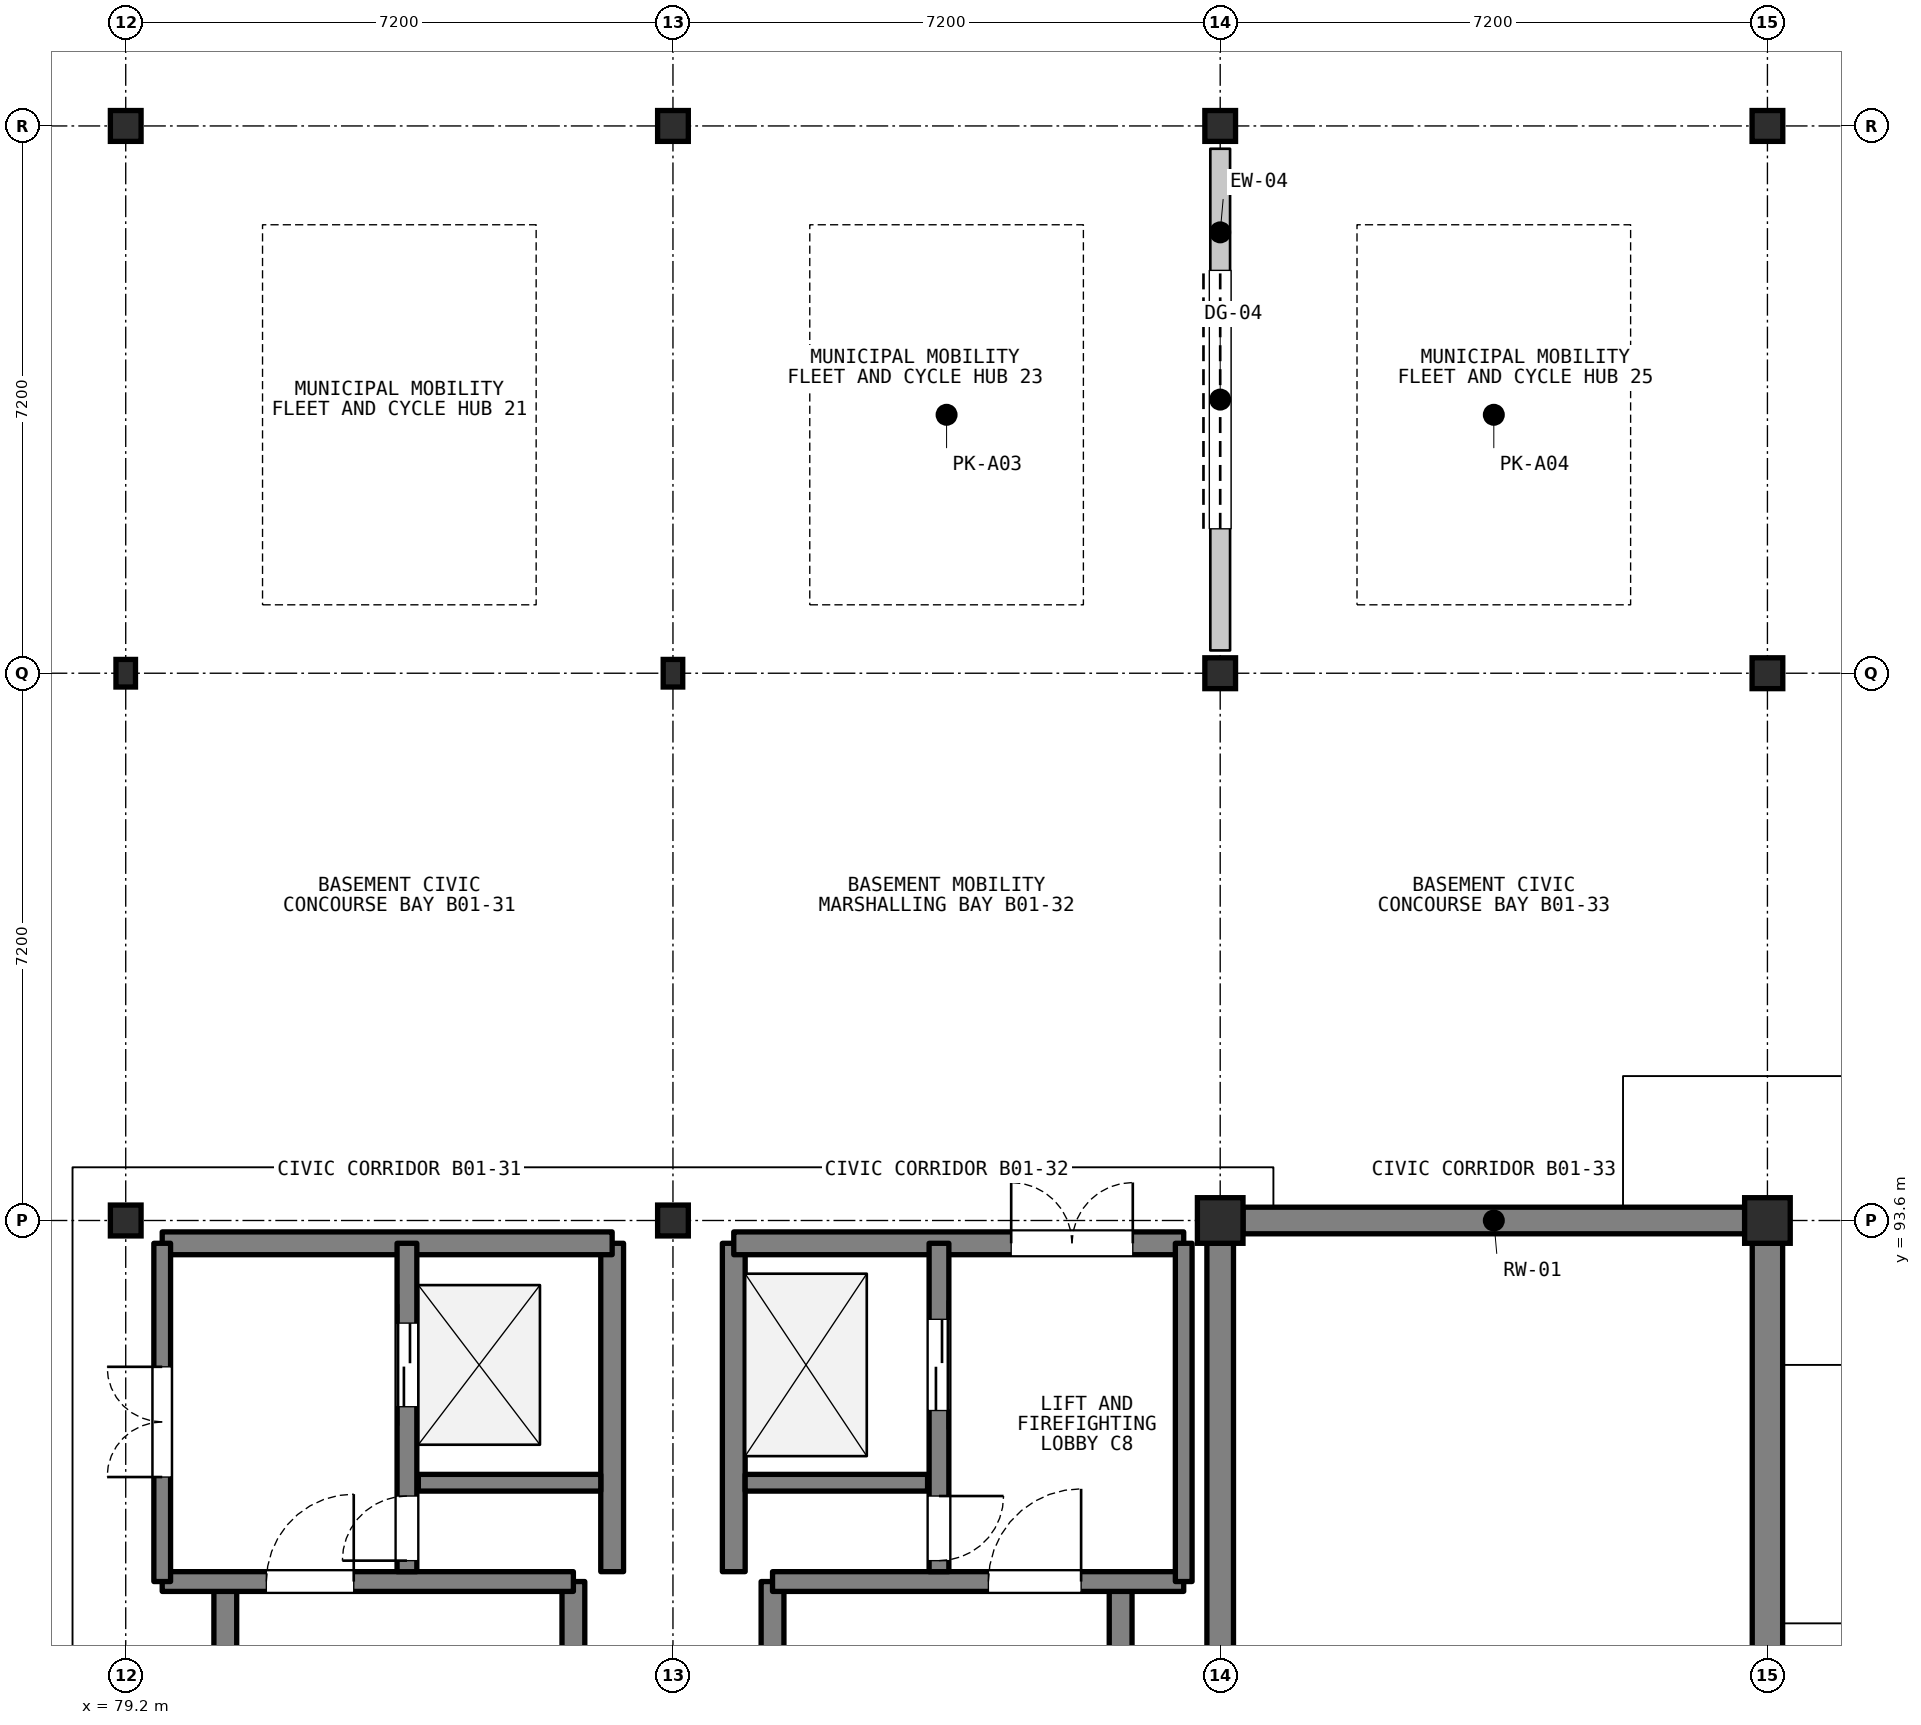
"""IFC4 building model, lengths in metres.
Left out: names, types, materials, properties, quantities, classifications, styles, units other than length and angle.
Written with IfcOpenShell. Run it as: python <this file> out.ifc"""

import sys

from ifc_helpers import new_model, si_unit, direction, frame, frame_2d, origin, origin_2d, place, context, subcontext, project, spatial, rectangle, i_section, extrude, element, fill, save


model = new_model("IFC4")
c1 = context("Model", 3, precision=1e-05, world=origin(), true_north=direction((0.0, 1.0)))
c2 = subcontext(c1, "Body", "Model", "MODEL_VIEW")
j1 = project(units=[si_unit("LENGTHUNIT", "METRE"), si_unit("PLANEANGLEUNIT", "RADIAN")], contexts=[c1])
p1 = place(None, origin())
s1 = spatial("IfcSite", under=j1, at=p1, CompositionType="ELEMENT")
p2 = place(p1, origin())
s2 = spatial("IfcBuilding", under=s1, at=p2, CompositionType="ELEMENT")
p3 = place(p2, frame((0.0, 0.0, -4.2)))
s3 = spatial("IfcBuildingStorey", under=s2, at=p3, CompositionType="ELEMENT", Elevation=-4.2)
for number, where, z_axis, x_axis in (
    (1, (93.6, 86.7, 0.0), (0.0, 0.0, 1.0), (0.0, 1.0, 0.0)),
    (2, (93.9, 93.6, 0.0), (0.0, 0.0, 1.0), (1.0, 0.0, 0.0)),
):
    element("IfcWall", number, at=place(p3, frame(where, z_axis=z_axis, x_axis=x_axis)), inside=s3, PredefinedType="USERDEFINED", context=c2, shape_type="SweptSolid", body=[
        extrude(rectangle(XDim=6.6, YDim=0.35, at=frame_2d((3.3, 0.0))), origin(), (0.0, 0.0, 1.0), 3.98),
    ])
p4 = place(p3, frame((100.8, 86.7, 0.0), z_axis=(0.0, 0.0, 1.0), x_axis=(0.0, 1.0, 0.0)))
e3 = element("IfcWall", 3, at=p4, inside=s3, PredefinedType="USERDEFINED", context=c2, shape_type="SweptSolid", body=[
    extrude(rectangle(XDim=6.6, YDim=0.4, at=frame_2d((3.3, 0.0))), origin(), (0.0, 0.0, 1.0), 3.98),
])
p5 = place(p3, frame((79.2, 93.6, 0.0), z_axis=(0.0, 0.0, 1.0), x_axis=(1.0, 0.0, 0.0)))
e4 = element("IfcColumn", 4, at=p5, inside=s3, PredefinedType="COLUMN", context=c2, shape_type="SweptSolid", body=[
    extrude(i_section(OverallWidth=0.404, OverallDepth=0.406, WebThickness=0.027, FlangeThickness=0.044, FilletRadius=0.015, at=origin_2d()), origin(), (0.0, 0.0, 1.0), 4.2),
])
p6 = place(p3, frame((79.2, 100.8, 0.0), z_axis=(0.0, 0.0, 1.0), x_axis=(1.0, 0.0, 0.0)))
e5 = element("IfcColumn", 5, at=p6, inside=s3, PredefinedType="COLUMN", context=c2, shape_type="SweptSolid", body=[
    extrude(i_section(OverallWidth=0.257, OverallDepth=0.363, WebThickness=0.013, FlangeThickness=0.022, FilletRadius=0.015, at=origin_2d()), origin(), (0.0, 0.0, 1.0), 4.2),
])
for number, where, z_axis, x_axis in (
    (6, (79.2, 108.0, 0.0), (0.0, 0.0, 1.0), (1.0, 0.0, 0.0)),
    (7, (86.4, 93.6, 0.0), (0.0, 0.0, 1.0), (1.0, 0.0, 0.0)),
):
    element("IfcColumn", number, at=place(p3, frame(where, z_axis=z_axis, x_axis=x_axis)), inside=s3, PredefinedType="COLUMN", context=c2, shape_type="SweptSolid", body=[
        extrude(i_section(OverallWidth=0.404, OverallDepth=0.406, WebThickness=0.027, FlangeThickness=0.044, FilletRadius=0.015, at=origin_2d()), origin(), (0.0, 0.0, 1.0), 4.2),
    ])
p7 = place(p3, frame((86.4, 100.8, 0.0), z_axis=(0.0, 0.0, 1.0), x_axis=(1.0, 0.0, 0.0)))
e8 = element("IfcColumn", 8, at=p7, inside=s3, PredefinedType="COLUMN", context=c2, shape_type="SweptSolid", body=[
    extrude(i_section(OverallWidth=0.257, OverallDepth=0.363, WebThickness=0.013, FlangeThickness=0.022, FilletRadius=0.015, at=origin_2d()), origin(), (0.0, 0.0, 1.0), 4.2),
])
p8 = place(p3, frame((86.4, 108.0, 0.0), z_axis=(0.0, 0.0, 1.0), x_axis=(1.0, 0.0, 0.0)))
e9 = element("IfcColumn", 9, at=p8, inside=s3, PredefinedType="COLUMN", context=c2, shape_type="SweptSolid", body=[
    extrude(i_section(OverallWidth=0.404, OverallDepth=0.406, WebThickness=0.027, FlangeThickness=0.044, FilletRadius=0.015, at=origin_2d()), origin(), (0.0, 0.0, 1.0), 4.2),
])
p9 = place(p3, frame((93.6, 93.6, 0.0), z_axis=(0.0, 0.0, 1.0), x_axis=(1.0, 0.0, 0.0)))
e10 = element("IfcColumn", 10, at=p9, inside=s3, PredefinedType="COLUMN", context=c2, shape_type="SweptSolid", body=[
    extrude(rectangle(XDim=0.6, YDim=0.6, at=origin_2d()), origin(), (0.0, 0.0, 1.0), 4.2),
])
for number, where, z_axis, x_axis in (
    (11, (93.6, 100.8, 0.0), (0.0, 0.0, 1.0), (1.0, 0.0, 0.0)),
    (12, (93.6, 108.0, 0.0), (0.0, 0.0, 1.0), (1.0, 0.0, 0.0)),
):
    element("IfcColumn", number, at=place(p3, frame(where, z_axis=z_axis, x_axis=x_axis)), inside=s3, PredefinedType="COLUMN", context=c2, shape_type="SweptSolid", body=[
        extrude(i_section(OverallWidth=0.404, OverallDepth=0.406, WebThickness=0.027, FlangeThickness=0.044, FilletRadius=0.015, at=origin_2d()), origin(), (0.0, 0.0, 1.0), 4.2),
    ])
p10 = place(p3, frame((100.8, 93.6, 0.0), z_axis=(0.0, 0.0, 1.0), x_axis=(1.0, 0.0, 0.0)))
e13 = element("IfcColumn", 13, at=p10, inside=s3, PredefinedType="COLUMN", context=c2, shape_type="SweptSolid", body=[
    extrude(rectangle(XDim=0.6, YDim=0.6, at=origin_2d()), origin(), (0.0, 0.0, 1.0), 4.2),
])
for number, where, z_axis, x_axis in (
    (14, (100.8, 100.8, 0.0), (0.0, 0.0, 1.0), (1.0, 0.0, 0.0)),
    (15, (100.8, 108.0, 0.0), (0.0, 0.0, 1.0), (1.0, 0.0, 0.0)),
):
    element("IfcColumn", number, at=place(p3, frame(where, z_axis=z_axis, x_axis=x_axis)), inside=s3, PredefinedType="COLUMN", context=c2, shape_type="SweptSolid", body=[
        extrude(i_section(OverallWidth=0.404, OverallDepth=0.406, WebThickness=0.027, FlangeThickness=0.044, FilletRadius=0.015, at=origin_2d()), origin(), (0.0, 0.0, 1.0), 4.2),
    ])
p11 = place(p3, frame((93.6, 101.1, 0.0), z_axis=(0.0, 0.0, 1.0), x_axis=(0.0, 1.0, 0.0)))
e16 = element("IfcWall", 16, at=p11, inside=s3, PredefinedType="SOLIDWALL", context=c2, shape_type="SweptSolid", body=[
    extrude(rectangle(XDim=6.6, YDim=0.26, at=frame_2d((3.3, 0.0))), origin(), (0.0, 0.0, 1.0), 3.22),
])
p12 = place(p11, frame((1.6, 0.0, 0.0)))
e17 = element("IfcOpeningElement", 17, at=p12, cuts=e16, PredefinedType="OPENING", context=c2, shape_type="SweptSolid", body=[
    extrude(rectangle(XDim=3.4, YDim=2.95, at=frame_2d((1.7, 1.475))), frame((0.0, 0.14, 0.0), z_axis=(0.0, -1.0, 0.0), x_axis=(1.0, 0.0, 0.0)), (0.0, 0.0, 1.0), 0.28),
])
for number, where, z_axis, x_axis in (
    (18, (80.51, 79.55, 0.0), (0.0, 0.0, 1.0), (0.0, 1.0, 0.0)),
    (19, (85.09, 79.55, 0.0), (0.0, 0.0, 1.0), (0.0, 1.0, 0.0)),
):
    element("IfcWall", number, at=place(p3, frame(where, z_axis=z_axis, x_axis=x_axis)), inside=s3, PredefinedType="SHEAR", context=c2, shape_type="SweptSolid", body=[
        extrude(rectangle(XDim=9.3, YDim=0.3, at=frame_2d((4.65, 0.0))), origin(), (0.0, 0.0, 1.0), 3.98),
    ])
p13 = place(p3, frame((79.68, 88.85, 0.0), z_axis=(0.0, 0.0, 1.0), x_axis=(1.0, 0.0, 0.0)))
e20 = element("IfcWall", 20, at=p13, inside=s3, PredefinedType="SHEAR", context=c2, shape_type="SweptSolid", body=[
    extrude(rectangle(XDim=5.41, YDim=0.26, at=frame_2d((2.705, 0.0))), origin(), (0.0, 0.0, 1.0), 3.98),
])
p14 = place(p13, frame((1.37, 0.0, 0.0)))
e21 = element("IfcOpeningElement", 21, at=p14, cuts=e20, PredefinedType="OPENING", context=c2, shape_type="SweptSolid", body=[
    extrude(rectangle(XDim=1.15, YDim=2.15, at=frame_2d((0.575, 1.075))), frame((0.0, 0.14, 0.0), z_axis=(0.0, -1.0, 0.0), x_axis=(1.0, 0.0, 0.0)), (0.0, 0.0, 1.0), 0.28),
])
p15 = place(p3, frame((85.6, 88.98, 0.0), z_axis=(0.0, 0.0, 1.0), x_axis=(0.0, 1.0, 0.0)))
e22 = element("IfcWall", 22, at=p15, inside=s3, PredefinedType="SHEAR", context=c2, shape_type="SweptSolid", body=[
    extrude(rectangle(XDim=4.32, YDim=0.3, at=frame_2d((2.16, 0.0))), origin(), (0.0, 0.0, 1.0), 3.98),
])
p16 = place(p3, frame((79.68, 93.3, 0.0), z_axis=(0.0, 0.0, 1.0), x_axis=(1.0, 0.0, 0.0)))
e23 = element("IfcWall", 23, at=p16, inside=s3, PredefinedType="SHEAR", context=c2, shape_type="SweptSolid", body=[
    extrude(rectangle(XDim=5.92, YDim=0.3, at=frame_2d((2.96, 0.0))), origin(), (0.0, 0.0, 1.0), 3.98),
])
p17 = place(p3, frame((83.05, 90.15, 0.0), z_axis=(0.0, 0.0, 1.0), x_axis=(1.0, 0.0, 0.0)))
e24 = element("IfcWall", 24, at=p17, inside=s3, PredefinedType="SHEAR", context=c2, shape_type="SweptSolid", body=[
    extrude(rectangle(XDim=2.4, YDim=0.22, at=frame_2d((1.2, 0.0))), origin(), (0.0, 0.0, 1.0), 3.98),
])
p18 = place(p3, frame((82.9, 88.98, 0.0), z_axis=(0.0, 0.0, 1.0), x_axis=(0.0, 1.0, 0.0)))
e25 = element("IfcWall", 25, at=p18, inside=s3, PredefinedType="SHEAR", context=c2, shape_type="SweptSolid", body=[
    extrude(rectangle(XDim=4.32, YDim=0.26, at=frame_2d((2.16, 0.0))), origin(), (0.0, 0.0, 1.0), 3.98),
])
p19 = place(p18, frame((2.17, 0.0, 0.0)))
e26 = element("IfcOpeningElement", 26, at=p19, cuts=e25, PredefinedType="OPENING", context=c2, shape_type="SweptSolid", body=[
    extrude(rectangle(XDim=1.1, YDim=2.15, at=frame_2d((0.55, 1.075))), frame((0.0, 0.14, 0.0), z_axis=(0.0, -1.0, 0.0), x_axis=(1.0, 0.0, 0.0)), (0.0, 0.0, 1.0), 0.28),
])
p20 = place(p18, frame((0.145, 0.0, 0.0)))
e27 = element("IfcOpeningElement", 27, at=p20, cuts=e25, PredefinedType="OPENING", context=c2, shape_type="SweptSolid", body=[
    extrude(rectangle(XDim=0.85, YDim=2.05, at=frame_2d((0.425, 1.025))), frame((0.0, 0.14, 0.0), z_axis=(0.0, -1.0, 0.0), x_axis=(1.0, 0.0, 0.0)), (0.0, 0.0, 1.0), 0.28),
])
p21 = place(p3, frame((79.68, 88.85, 0.0), z_axis=(0.0, 0.0, 1.0), x_axis=(0.0, 1.0, 0.0)))
e28 = element("IfcWall", 28, at=p21, inside=s3, PredefinedType="SHEAR", context=c2, shape_type="SweptSolid", body=[
    extrude(rectangle(XDim=4.45, YDim=0.22, at=frame_2d((2.225, 0.0))), origin(), (0.0, 0.0, 1.0), 3.98),
])
p22 = place(p21, frame((1.375, 0.0, 0.0)))
e29 = element("IfcOpeningElement", 29, at=p22, cuts=e28, PredefinedType="OPENING", context=c2, shape_type="SweptSolid", body=[
    extrude(rectangle(XDim=1.45, YDim=2.2, at=frame_2d((0.725, 1.1))), frame((0.0, 0.12, 0.0), z_axis=(0.0, -1.0, 0.0), x_axis=(1.0, 0.0, 0.0)), (0.0, 0.0, 1.0), 0.24),
])
for number, where, z_axis, x_axis in (
    (30, (87.71, 79.55, 0.0), (0.0, 0.0, 1.0), (0.0, 1.0, 0.0)),
    (31, (92.29, 79.55, 0.0), (0.0, 0.0, 1.0), (0.0, 1.0, 0.0)),
):
    element("IfcWall", number, at=place(p3, frame(where, z_axis=z_axis, x_axis=x_axis)), inside=s3, PredefinedType="SHEAR", context=c2, shape_type="SweptSolid", body=[
        extrude(rectangle(XDim=9.3, YDim=0.3, at=frame_2d((4.65, 0.0))), origin(), (0.0, 0.0, 1.0), 3.98),
    ])
p23 = place(p3, frame((87.71, 88.85, 0.0), z_axis=(0.0, 0.0, 1.0), x_axis=(1.0, 0.0, 0.0)))
e32 = element("IfcWall", 32, at=p23, inside=s3, PredefinedType="SHEAR", context=c2, shape_type="SweptSolid", body=[
    extrude(rectangle(XDim=5.41, YDim=0.26, at=frame_2d((2.705, 0.0))), origin(), (0.0, 0.0, 1.0), 3.98),
])
p24 = place(p23, frame((2.84, 0.0, 0.0)))
e33 = element("IfcOpeningElement", 33, at=p24, cuts=e32, PredefinedType="OPENING", context=c2, shape_type="SweptSolid", body=[
    extrude(rectangle(XDim=1.22, YDim=2.15, at=frame_2d((0.61, 1.075))), frame((0.0, 0.14, 0.0), z_axis=(0.0, -1.0, 0.0), x_axis=(1.0, 0.0, 0.0)), (0.0, 0.0, 1.0), 0.28),
])
p25 = place(p3, frame((87.2, 88.98, 0.0), z_axis=(0.0, 0.0, 1.0), x_axis=(0.0, 1.0, 0.0)))
e34 = element("IfcWall", 34, at=p25, inside=s3, PredefinedType="SHEAR", context=c2, shape_type="SweptSolid", body=[
    extrude(rectangle(XDim=4.32, YDim=0.3, at=frame_2d((2.16, 0.0))), origin(), (0.0, 0.0, 1.0), 3.98),
])
p26 = place(p3, frame((87.2, 93.3, 0.0), z_axis=(0.0, 0.0, 1.0), x_axis=(1.0, 0.0, 0.0)))
e35 = element("IfcWall", 35, at=p26, inside=s3, PredefinedType="SHEAR", context=c2, shape_type="SweptSolid", body=[
    extrude(rectangle(XDim=5.92, YDim=0.3, at=frame_2d((2.96, 0.0))), origin(), (0.0, 0.0, 1.0), 3.98),
])
p27 = place(p26, frame((3.65, 0.0, 0.0)))
e36 = element("IfcOpeningElement", 36, at=p27, cuts=e35, PredefinedType="OPENING", context=c2, shape_type="SweptSolid", body=[
    extrude(rectangle(XDim=1.6, YDim=2.2, at=frame_2d((0.8, 1.1))), frame((0.0, 0.16, 0.0), z_axis=(0.0, -1.0, 0.0), x_axis=(1.0, 0.0, 0.0)), (0.0, 0.0, 1.0), 0.32),
])
p28 = place(p3, frame((87.35, 90.15, 0.0), z_axis=(0.0, 0.0, 1.0), x_axis=(1.0, 0.0, 0.0)))
e37 = element("IfcWall", 37, at=p28, inside=s3, PredefinedType="SHEAR", context=c2, shape_type="SweptSolid", body=[
    extrude(rectangle(XDim=2.4, YDim=0.22, at=frame_2d((1.2, 0.0))), origin(), (0.0, 0.0, 1.0), 3.98),
])
p29 = place(p3, frame((89.9, 93.3, 0.0), z_axis=(0.0, 0.0, 1.0), x_axis=(0.0, -1.0, 0.0)))
e38 = element("IfcWall", 38, at=p29, inside=s3, PredefinedType="SHEAR", context=c2, shape_type="SweptSolid", body=[
    extrude(rectangle(XDim=4.32, YDim=0.26, at=frame_2d((2.16, 0.0))), origin(), (0.0, 0.0, 1.0), 3.98),
])
p30 = place(p29, frame((1.0, 0.0, 0.0)))
e39 = element("IfcOpeningElement", 39, at=p30, cuts=e38, PredefinedType="OPENING", context=c2, shape_type="SweptSolid", body=[
    extrude(rectangle(XDim=1.2, YDim=2.15, at=frame_2d((0.6, 1.075))), frame((0.0, 0.14, 0.0), z_axis=(0.0, -1.0, 0.0), x_axis=(1.0, 0.0, 0.0)), (0.0, 0.0, 1.0), 0.28),
])
p31 = place(p29, frame((3.325, 0.0, 0.0)))
e40 = element("IfcOpeningElement", 40, at=p31, cuts=e38, PredefinedType="OPENING", context=c2, shape_type="SweptSolid", body=[
    extrude(rectangle(XDim=0.85, YDim=2.05, at=frame_2d((0.425, 1.025))), frame((0.0, 0.14, 0.0), z_axis=(0.0, -1.0, 0.0), x_axis=(1.0, 0.0, 0.0)), (0.0, 0.0, 1.0), 0.28),
])
p32 = place(p3, frame((93.12, 93.3, 0.0), z_axis=(0.0, 0.0, 1.0), x_axis=(0.0, -1.0, 0.0)))
e41 = element("IfcWall", 41, at=p32, inside=s3, PredefinedType="SHEAR", context=c2, shape_type="SweptSolid", body=[
    extrude(rectangle(XDim=4.45, YDim=0.22, at=frame_2d((2.225, 0.0))), origin(), (0.0, 0.0, 1.0), 3.98),
])
p33 = place(p12, origin())
e42 = element("IfcDoor", 42, at=p33, inside=s3, OperationType="ROLLINGUP", PredefinedType="GATE", context=c2, shape_type="SweptSolid", body=[
    extrude(rectangle(XDim=3.4, YDim=2.95, at=frame_2d((1.7, 1.475))), frame((0.0, 0.025, 0.0), z_axis=(0.0, -1.0, 0.0), x_axis=(1.0, 0.0, 0.0)), (0.0, 0.0, 1.0), 0.05),
])
fill(e17, e42)
p34 = place(p14, origin())
e43 = element("IfcDoor", 43, at=p34, inside=s3, OperationType="SINGLE_SWING_RIGHT", PredefinedType="DOOR", context=c2, shape_type="SweptSolid", body=[
    extrude(rectangle(XDim=1.15, YDim=2.15, at=frame_2d((0.575, 1.075))), frame((0.0, 0.025, 0.0), z_axis=(0.0, -1.0, 0.0), x_axis=(1.0, 0.0, 0.0)), (0.0, 0.0, 1.0), 0.05),
])
fill(e21, e43)
p35 = place(p19, origin())
e44 = element("IfcDoor", 44, at=p35, inside=s3, OperationType="DOUBLE_DOOR_SLIDING", PredefinedType="DOOR", context=c2, shape_type="SweptSolid", body=[
    extrude(rectangle(XDim=1.1, YDim=2.15, at=frame_2d((0.55, 1.075))), frame((0.0, 0.025, 0.0), z_axis=(0.0, -1.0, 0.0), x_axis=(1.0, 0.0, 0.0)), (0.0, 0.0, 1.0), 0.05),
])
fill(e26, e44)
p36 = place(p20, origin())
e45 = element("IfcDoor", 45, at=p36, inside=s3, OperationType="SINGLE_SWING_LEFT", PredefinedType="DOOR", context=c2, shape_type="SweptSolid", body=[
    extrude(rectangle(XDim=0.85, YDim=2.05, at=frame_2d((0.425, 1.025))), frame((0.0, 0.025, 0.0), z_axis=(0.0, -1.0, 0.0), x_axis=(1.0, 0.0, 0.0)), (0.0, 0.0, 1.0), 0.05),
])
fill(e27, e45)
p37 = place(p22, origin())
e46 = element("IfcDoor", 46, at=p37, inside=s3, OperationType="DOUBLE_DOOR_SINGLE_SWING", PredefinedType="DOOR", context=c2, shape_type="SweptSolid", body=[
    extrude(rectangle(XDim=1.45, YDim=2.2, at=frame_2d((0.725, 1.1))), frame((0.0, 0.025, 0.0), z_axis=(0.0, -1.0, 0.0), x_axis=(1.0, 0.0, 0.0)), (0.0, 0.0, 1.0), 0.05),
])
fill(e29, e46)
p38 = place(p24, origin())
e47 = element("IfcDoor", 47, at=p38, inside=s3, OperationType="SINGLE_SWING_RIGHT", PredefinedType="DOOR", context=c2, shape_type="SweptSolid", body=[
    extrude(rectangle(XDim=1.22, YDim=2.15, at=frame_2d((0.61, 1.075))), frame((0.0, 0.025, 0.0), z_axis=(0.0, -1.0, 0.0), x_axis=(1.0, 0.0, 0.0)), (0.0, 0.0, 1.0), 0.05),
])
fill(e33, e47)
p39 = place(p30, origin())
e48 = element("IfcDoor", 48, at=p39, inside=s3, OperationType="DOUBLE_DOOR_SLIDING", PredefinedType="DOOR", context=c2, shape_type="SweptSolid", body=[
    extrude(rectangle(XDim=1.2, YDim=2.15, at=frame_2d((0.6, 1.075))), frame((0.0, 0.025, 0.0), z_axis=(0.0, -1.0, 0.0), x_axis=(1.0, 0.0, 0.0)), (0.0, 0.0, 1.0), 0.05),
])
fill(e39, e48)
p40 = place(p31, origin())
e49 = element("IfcDoor", 49, at=p40, inside=s3, OperationType="SINGLE_SWING_LEFT", PredefinedType="DOOR", context=c2, shape_type="SweptSolid", body=[
    extrude(rectangle(XDim=0.85, YDim=2.05, at=frame_2d((0.425, 1.025))), frame((0.0, 0.025, 0.0), z_axis=(0.0, -1.0, 0.0), x_axis=(1.0, 0.0, 0.0)), (0.0, 0.0, 1.0), 0.05),
])
fill(e40, e49)
p41 = place(p27, origin())
e50 = element("IfcDoor", 50, at=p41, inside=s3, OperationType="DOUBLE_DOOR_SINGLE_SWING", PredefinedType="DOOR", context=c2, shape_type="SweptSolid", body=[
    extrude(rectangle(XDim=1.6, YDim=2.2, at=frame_2d((0.8, 1.1))), frame((0.0, 0.025, 0.0), z_axis=(0.0, -1.0, 0.0), x_axis=(1.0, 0.0, 0.0)), (0.0, 0.0, 1.0), 0.05),
])
fill(e36, e50)
save(model, sys.argv[1])
